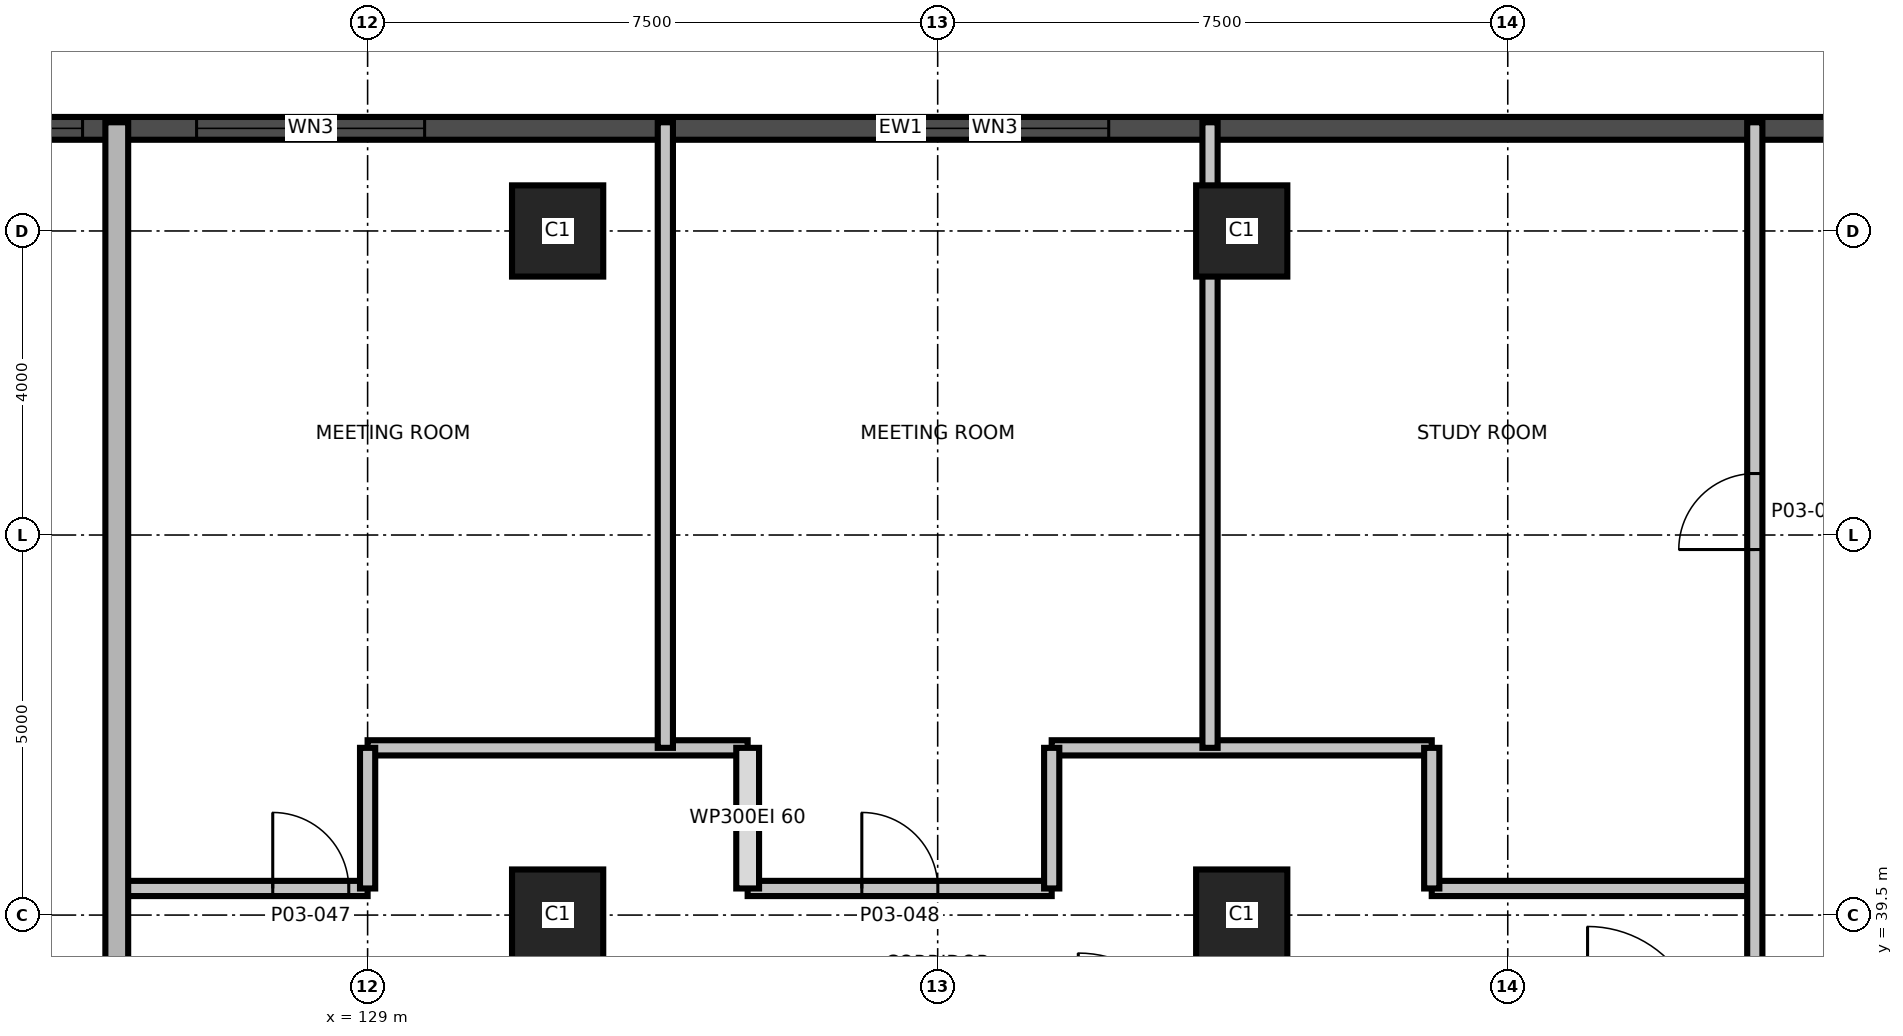
"""IFC4 building model, lengths in metres.
Left out: names, types, materials, properties, quantities, classifications, styles, units other than length and angle.
Written with IfcOpenShell. Run it as: python <this file> out.ifc"""

import sys

from ifc_helpers import new_model, si_unit, direction, frame, frame_2d, origin, origin_2d, place, context, subcontext, project, spatial, rectangle, extrude, element, fill, save


model = new_model("IFC4")
c1 = context("Model", 3, precision=1e-05, world=origin(), true_north=direction((0.0, 1.0)))
c2 = subcontext(c1, "Body", "Model", "MODEL_VIEW")
j1 = project(units=[si_unit("LENGTHUNIT", "METRE"), si_unit("PLANEANGLEUNIT", "RADIAN")], contexts=[c1])
p1 = place(None, origin())
s1 = spatial("IfcSite", under=j1, at=p1, CompositionType="ELEMENT")
p2 = place(p1, origin())
s2 = spatial("IfcBuilding", under=s1, at=p2, CompositionType="ELEMENT")
p3 = place(p2, frame((0.0, 0.0, 18.5)))
s3 = spatial("IfcBuildingStorey", under=s2, at=p3, CompositionType="ELEMENT", Elevation=18.5)
for number, where, z_axis, x_axis in (
    (1, (131.5, 39.5, 0.0), (0.0, 0.0, 1.0), (1.0, 0.0, 0.0)),
    (2, (140.5, 39.5, 0.0), (0.0, 0.0, 1.0), (1.0, 0.0, 0.0)),
    (3, (131.5, 48.5, 0.0), (0.0, 0.0, 1.0), (1.0, 0.0, 0.0)),
    (4, (140.5, 48.5, 0.0), (0.0, 0.0, 1.0), (1.0, 0.0, 0.0)),
):
    element("IfcColumn", number, at=place(p3, frame(where, z_axis=z_axis, x_axis=x_axis)), inside=s3, PredefinedType="COLUMN", context=c2, shape_type="SweptSolid", body=[
        extrude(rectangle(XDim=1.2, YDim=1.2, at=origin_2d()), origin(), (0.0, 0.0, 1.0), 5.0),
    ])
p4 = place(p3, frame((153.952, 49.85, 0.0), z_axis=(0.0, 0.0, 1.0), x_axis=(-1.0, 0.0, 0.0)))
e5 = element("IfcWall", 5, at=p4, inside=s3, PredefinedType="SOLIDWALL", context=c2, shape_type="SweptSolid", body=[
    extrude(rectangle(XDim=35.88, YDim=0.3, at=frame_2d((17.94, 0.0))), origin(), (0.0, 0.0, 1.0), 4.7),
])
p5 = place(p4, frame((1.226, 0.0, 0.9)))
e6 = element("IfcOpeningElement", 6, at=p5, cuts=e5, PredefinedType="OPENING", context=c2, shape_type="SweptSolid", body=[
    extrude(rectangle(XDim=3.0, YDim=2.4, at=frame_2d((1.5, 1.2))), frame((0.0, 0.16, 0.0), z_axis=(0.0, -1.0, 0.0), x_axis=(1.0, 0.0, 0.0)), (0.0, 0.0, 1.0), 0.32),
])
p6 = place(p4, frame((15.202, 0.0, 0.9)))
e7 = element("IfcOpeningElement", 7, at=p6, cuts=e5, PredefinedType="OPENING", context=c2, shape_type="SweptSolid", body=[
    extrude(rectangle(XDim=3.0, YDim=2.4, at=frame_2d((1.5, 1.2))), frame((0.0, 0.16, 0.0), z_axis=(0.0, -1.0, 0.0), x_axis=(1.0, 0.0, 0.0)), (0.0, 0.0, 1.0), 0.32),
])
p7 = place(p4, frame((24.202, 0.0, 0.9)))
e8 = element("IfcOpeningElement", 8, at=p7, cuts=e5, PredefinedType="OPENING", context=c2, shape_type="SweptSolid", body=[
    extrude(rectangle(XDim=3.0, YDim=2.4, at=frame_2d((1.5, 1.2))), frame((0.0, 0.16, 0.0), z_axis=(0.0, -1.0, 0.0), x_axis=(1.0, 0.0, 0.0)), (0.0, 0.0, 1.0), 0.32),
])
p8 = place(p4, frame((28.702, 0.0, 0.9)))
e9 = element("IfcOpeningElement", 9, at=p8, cuts=e5, PredefinedType="OPENING", context=c2, shape_type="SweptSolid", body=[
    extrude(rectangle(XDim=3.0, YDim=2.4, at=frame_2d((1.5, 1.2))), frame((0.0, 0.16, 0.0), z_axis=(0.0, -1.0, 0.0), x_axis=(1.0, 0.0, 0.0)), (0.0, 0.0, 1.0), 0.32),
])
p9 = place(p3, frame((125.75, 39.85, 0.0), z_axis=(0.0, 0.0, 1.0), x_axis=(1.0, 0.0, 0.0)))
e10 = element("IfcWall", 10, at=p9, inside=s3, PredefinedType="PARTITIONING", context=c2, shape_type="SweptSolid", body=[
    extrude(rectangle(XDim=3.25, YDim=0.2, at=frame_2d((1.625, 0.0))), origin(), (0.0, 0.0, 1.0), 4.7),
])
p10 = place(p9, frame((2.002, 0.0, 0.0)))
e11 = element("IfcOpeningElement", 11, at=p10, cuts=e10, PredefinedType="OPENING", context=c2, shape_type="SweptSolid", body=[
    extrude(rectangle(XDim=1.0, YDim=2.1, at=frame_2d((0.5, 1.05))), frame((0.0, 0.11, 0.0), z_axis=(0.0, -1.0, 0.0), x_axis=(1.0, 0.0, 0.0)), (0.0, 0.0, 1.0), 0.22),
])
p11 = place(p3, frame((134.0, 39.85, 0.0), z_axis=(0.0, 0.0, 1.0), x_axis=(1.0, 0.0, 0.0)))
e12 = element("IfcWall", 12, at=p11, inside=s3, PredefinedType="PARTITIONING", context=c2, shape_type="SweptSolid", body=[
    extrude(rectangle(XDim=4.0, YDim=0.2, at=frame_2d((2.0, 0.0))), origin(), (0.0, 0.0, 1.0), 4.7),
])
p12 = place(p11, frame((1.502, 0.0, 0.0)))
e13 = element("IfcOpeningElement", 13, at=p12, cuts=e12, PredefinedType="OPENING", context=c2, shape_type="SweptSolid", body=[
    extrude(rectangle(XDim=1.0, YDim=2.1, at=frame_2d((0.5, 1.05))), frame((0.0, 0.11, 0.0), z_axis=(0.0, -1.0, 0.0), x_axis=(1.0, 0.0, 0.0)), (0.0, 0.0, 1.0), 0.22),
])
p13 = place(p3, frame((143.0, 39.85, 0.0), z_axis=(0.0, 0.0, 1.0), x_axis=(1.0, 0.0, 0.0)))
e14 = element("IfcWall", 14, at=p13, inside=s3, PredefinedType="PARTITIONING", context=c2, shape_type="SweptSolid", body=[
    extrude(rectangle(XDim=4.25, YDim=0.2, at=frame_2d((2.125, 0.0))), origin(), (0.0, 0.0, 1.0), 4.7),
])
for number, where, z_axis, x_axis in (
    (15, (129.0, 41.7, 0.0), (0.0, 0.0, 1.0), (1.0, 0.0, 0.0)),
    (16, (138.0, 41.7, 0.0), (0.0, 0.0, 1.0), (1.0, 0.0, 0.0)),
):
    element("IfcWall", number, at=place(p3, frame(where, z_axis=z_axis, x_axis=x_axis)), inside=s3, PredefinedType="PARTITIONING", context=c2, shape_type="SweptSolid", body=[
        extrude(rectangle(XDim=5.0, YDim=0.2, at=frame_2d((2.5, 0.0))), origin(), (0.0, 0.0, 1.0), 4.7),
    ])
p14 = place(p3, frame((125.7, 11.07, 0.0), z_axis=(0.0, 0.0, 1.0), x_axis=(0.0, 1.0, 0.0)))
e17 = element("IfcWall", 17, at=p14, inside=s3, PredefinedType="SHEAR", context=c2, shape_type="SweptSolid", body=[
    extrude(rectangle(XDim=38.86, YDim=0.3, at=frame_2d((19.43, 0.0))), origin(), (0.0, 0.0, 1.0), 4.7),
])
p15 = place(p14, frame((24.73, 0.0, 0.0)))
e18 = element("IfcOpeningElement", 18, at=p15, cuts=e17, PredefinedType="OPENING", context=c2, shape_type="SweptSolid", body=[
    extrude(rectangle(XDim=1.2, YDim=2.1, at=frame_2d((0.6, 1.05))), frame((0.0, 0.16, 0.0), z_axis=(0.0, -1.0, 0.0), x_axis=(1.0, 0.0, 0.0)), (0.0, 0.0, 1.0), 0.32),
])
p16 = place(p3, frame((129.0, 39.85, 0.0), z_axis=(0.0, 0.0, 1.0), x_axis=(0.0, 1.0, 0.0)))
e19 = element("IfcWall", 19, at=p16, inside=s3, PredefinedType="PARTITIONING", context=c2, shape_type="SweptSolid", body=[
    extrude(rectangle(XDim=1.85, YDim=0.2, at=frame_2d((0.925, 0.0))), origin(), (0.0, 0.0, 1.0), 4.7),
])
p17 = place(p3, frame((132.917, 41.7, 0.0), z_axis=(0.0, 0.0, 1.0), x_axis=(0.0, 1.0, 0.0)))
e20 = element("IfcWall", 20, at=p17, inside=s3, PredefinedType="PARTITIONING", context=c2, shape_type="SweptSolid", body=[
    extrude(rectangle(XDim=8.23, YDim=0.2, at=frame_2d((4.115, 0.0))), origin(), (0.0, 0.0, 1.0), 4.7),
])
p18 = place(p3, frame((134.0, 39.85, 0.0), z_axis=(0.0, 0.0, 1.0), x_axis=(0.0, 1.0, 0.0)))
e21 = element("IfcWall", 21, at=p18, inside=s3, PredefinedType="PARTITIONING", context=c2, shape_type="SweptSolid", body=[
    extrude(rectangle(XDim=1.85, YDim=0.3, at=frame_2d((0.925, 0.0))), origin(), (0.0, 0.0, 1.0), 4.7),
])
p19 = place(p3, frame((138.0, 39.85, 0.0), z_axis=(0.0, 0.0, 1.0), x_axis=(0.0, 1.0, 0.0)))
e22 = element("IfcWall", 22, at=p19, inside=s3, PredefinedType="PARTITIONING", context=c2, shape_type="SweptSolid", body=[
    extrude(rectangle(XDim=1.85, YDim=0.2, at=frame_2d((0.925, 0.0))), origin(), (0.0, 0.0, 1.0), 4.7),
])
p20 = place(p3, frame((140.083, 41.7, 0.0), z_axis=(0.0, 0.0, 1.0), x_axis=(0.0, 1.0, 0.0)))
e23 = element("IfcWall", 23, at=p20, inside=s3, PredefinedType="PARTITIONING", context=c2, shape_type="SweptSolid", body=[
    extrude(rectangle(XDim=8.23, YDim=0.2, at=frame_2d((4.115, 0.0))), origin(), (0.0, 0.0, 1.0), 4.7),
])
p21 = place(p3, frame((143.0, 39.85, 0.0), z_axis=(0.0, 0.0, 1.0), x_axis=(0.0, 1.0, 0.0)))
e24 = element("IfcWall", 24, at=p21, inside=s3, PredefinedType="PARTITIONING", context=c2, shape_type="SweptSolid", body=[
    extrude(rectangle(XDim=1.85, YDim=0.2, at=frame_2d((0.925, 0.0))), origin(), (0.0, 0.0, 1.0), 4.7),
])
p22 = place(p3, frame((147.25, 11.07, 0.0), z_axis=(0.0, 0.0, 1.0), x_axis=(0.0, 1.0, 0.0)))
e25 = element("IfcWall", 25, at=p22, inside=s3, PredefinedType="PARTITIONING", context=c2, shape_type="SweptSolid", body=[
    extrude(rectangle(XDim=38.86, YDim=0.2, at=frame_2d((19.43, 0.0))), origin(), (0.0, 0.0, 1.0), 4.7),
])
p23 = place(p22, frame((18.18, 0.0, 0.0)))
e26 = element("IfcOpeningElement", 26, at=p23, cuts=e25, PredefinedType="OPENING", context=c2, shape_type="SweptSolid", body=[
    extrude(rectangle(XDim=1.5, YDim=2.1, at=frame_2d((0.75, 1.05))), frame((0.0, 0.11, 0.0), z_axis=(0.0, -1.0, 0.0), x_axis=(1.0, 0.0, 0.0)), (0.0, 0.0, 1.0), 0.22),
])
p24 = place(p22, frame((33.239, 0.0, 0.0)))
e27 = element("IfcOpeningElement", 27, at=p24, cuts=e25, PredefinedType="OPENING", context=c2, shape_type="SweptSolid", body=[
    extrude(rectangle(XDim=1.0, YDim=2.1, at=frame_2d((0.5, 1.05))), frame((0.0, 0.11, 0.0), z_axis=(0.0, -1.0, 0.0), x_axis=(1.0, 0.0, 0.0)), (0.0, 0.0, 1.0), 0.22),
])
p25 = place(p6, origin())
e28 = element("IfcWindow", 28, at=p25, inside=s3, PartitioningType="SINGLE_PANEL", PredefinedType="WINDOW", context=c2, shape_type="SweptSolid", body=[
    extrude(rectangle(XDim=3.0, YDim=2.4, at=frame_2d((1.5, 1.2))), frame((0.0, 0.03, 0.0), z_axis=(0.0, -1.0, 0.0), x_axis=(1.0, 0.0, 0.0)), (0.0, 0.0, 1.0), 0.06),
])
fill(e7, e28)
p26 = place(p7, origin())
e29 = element("IfcWindow", 29, at=p26, inside=s3, PartitioningType="SINGLE_PANEL", PredefinedType="WINDOW", context=c2, shape_type="SweptSolid", body=[
    extrude(rectangle(XDim=3.0, YDim=2.4, at=frame_2d((1.5, 1.2))), frame((0.0, 0.03, 0.0), z_axis=(0.0, -1.0, 0.0), x_axis=(1.0, 0.0, 0.0)), (0.0, 0.0, 1.0), 0.06),
])
fill(e8, e29)
p27 = place(p8, origin())
e30 = element("IfcWindow", 30, at=p27, inside=s3, PartitioningType="SINGLE_PANEL", PredefinedType="WINDOW", context=c2, shape_type="SweptSolid", body=[
    extrude(rectangle(XDim=3.0, YDim=2.4, at=frame_2d((1.5, 1.2))), frame((0.0, 0.03, 0.0), z_axis=(0.0, -1.0, 0.0), x_axis=(1.0, 0.0, 0.0)), (0.0, 0.0, 1.0), 0.06),
])
fill(e9, e30)
p28 = place(p10, origin())
e31 = element("IfcDoor", 31, at=p28, inside=s3, OperationType="SINGLE_SWING_LEFT", PredefinedType="DOOR", context=c2, shape_type="SweptSolid", body=[
    extrude(rectangle(XDim=1.0, YDim=2.1, at=frame_2d((0.5, 1.05))), frame((0.0, 0.025, 0.0), z_axis=(0.0, -1.0, 0.0), x_axis=(1.0, 0.0, 0.0)), (0.0, 0.0, 1.0), 0.05),
])
fill(e11, e31)
p29 = place(p12, origin())
e32 = element("IfcDoor", 32, at=p29, inside=s3, OperationType="SINGLE_SWING_RIGHT", PredefinedType="DOOR", context=c2, shape_type="SweptSolid", body=[
    extrude(rectangle(XDim=1.0, YDim=2.1, at=frame_2d((0.5, 1.05))), frame((0.0, 0.025, 0.0), z_axis=(0.0, -1.0, 0.0), x_axis=(1.0, 0.0, 0.0)), (0.0, 0.0, 1.0), 0.05),
])
fill(e13, e32)
p30 = place(p24, origin())
e33 = element("IfcDoor", 33, at=p30, inside=s3, OperationType="SINGLE_SWING_LEFT", PredefinedType="DOOR", context=c2, shape_type="SweptSolid", body=[
    extrude(rectangle(XDim=1.0, YDim=2.1, at=frame_2d((0.5, 1.05))), frame((0.0, 0.025, 0.0), z_axis=(0.0, -1.0, 0.0), x_axis=(1.0, 0.0, 0.0)), (0.0, 0.0, 1.0), 0.05),
])
fill(e27, e33)
save(model, sys.argv[1])
